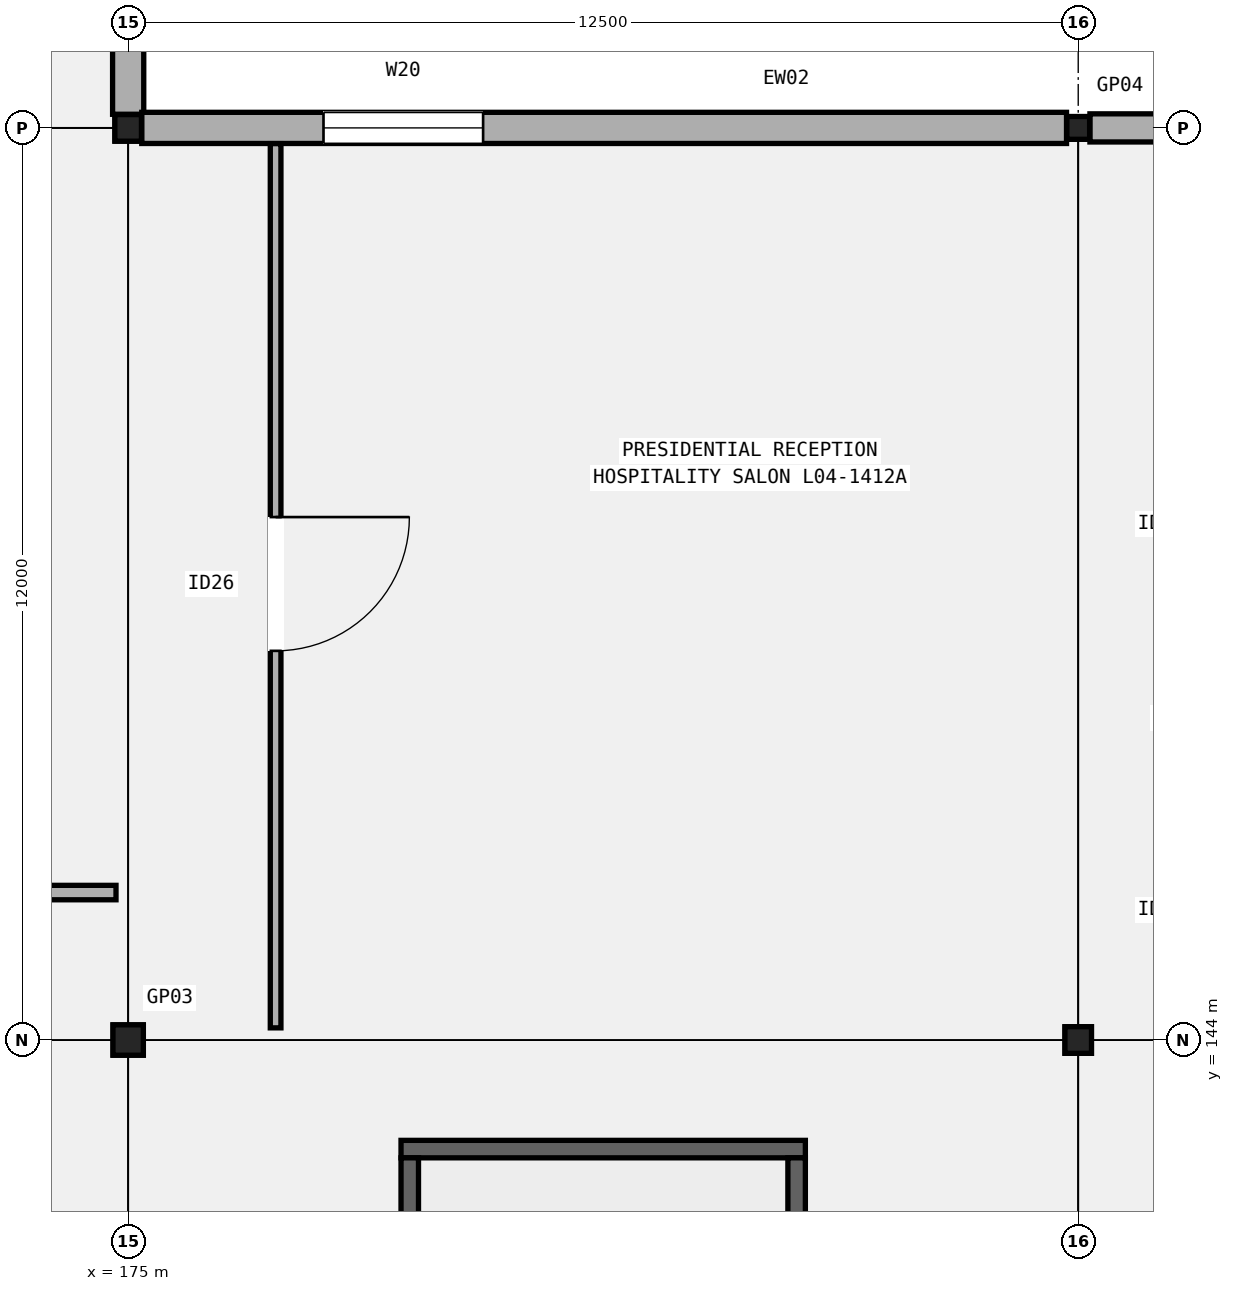
"""IFC4 building model, lengths in metres.
Left out: names, types, materials, properties, quantities, classifications, styles, units other than length and angle.
Written with IfcOpenShell. Run it as: python <this file> out.ifc"""

import sys

from ifc_helpers import new_model, si_unit, direction, frame, frame_2d, origin, origin_2d, place, context, subcontext, project, spatial, rectangle, hollow_rectangle, extrude, element, fill, save


model = new_model("IFC4")
c1 = context("Model", 3, precision=1e-05, world=origin(), true_north=direction((0.0, 1.0)))
c2 = subcontext(c1, "Body", "Model", "MODEL_VIEW")
j1 = project(units=[si_unit("LENGTHUNIT", "METRE"), si_unit("PLANEANGLEUNIT", "RADIAN")], contexts=[c1])
p1 = place(None, origin())
s1 = spatial("IfcSite", under=j1, at=p1, CompositionType="ELEMENT")
p2 = place(p1, origin())
s2 = spatial("IfcBuilding", under=s1, at=p2, CompositionType="ELEMENT")
p3 = place(p2, frame((0.0, 0.0, 20.4)))
s3 = spatial("IfcBuildingStorey", under=s2, at=p3, CompositionType="ELEMENT", Elevation=20.4)
p4 = place(p3, frame((175.0, 144.0, 0.0), z_axis=(0.0, 0.0, 1.0), x_axis=(1.0, 0.0, 0.0)))
e1 = element("IfcColumn", 1, at=p4, inside=s3, PredefinedType="COLUMN", context=c2, shape_type="SweptSolid", body=[
    extrude(hollow_rectangle(XDim=0.4, YDim=0.4, WallThickness=0.016, InnerFilletRadius=0.016, OuterFilletRadius=0.032, at=origin_2d()), origin(), (0.0, 0.0, 1.0), 5.4),
])
for number, where, z_axis, x_axis in (
    (2, (175.0, 156.0, 0.0), (0.0, 0.0, 1.0), (1.0, 0.0, 0.0)),
    (3, (187.5, 144.0, 0.0), (0.0, 0.0, 1.0), (1.0, 0.0, 0.0)),
):
    element("IfcColumn", number, at=place(p3, frame(where, z_axis=z_axis, x_axis=x_axis)), inside=s3, PredefinedType="COLUMN", context=c2, shape_type="SweptSolid", body=[
        extrude(hollow_rectangle(XDim=0.35, YDim=0.35, WallThickness=0.016, InnerFilletRadius=0.016, OuterFilletRadius=0.032, at=origin_2d()), origin(), (0.0, 0.0, 1.0), 5.4),
    ])
p5 = place(p3, frame((187.5, 156.0, 0.0), z_axis=(0.0, 0.0, 1.0), x_axis=(1.0, 0.0, 0.0)))
e4 = element("IfcColumn", 4, at=p5, inside=s3, PredefinedType="COLUMN", context=c2, shape_type="SweptSolid", body=[
    extrude(hollow_rectangle(XDim=0.3, YDim=0.3, WallThickness=0.012, InnerFilletRadius=0.012, OuterFilletRadius=0.024, at=origin_2d()), origin(), (0.0, 0.0, 1.0), 5.4),
])
p6 = place(p3, frame((175.0, 156.179, 0.0), z_axis=(0.0, 0.0, 1.0), x_axis=(0.0, 1.0, 0.0)))
e5 = element("IfcWall", 5, at=p6, inside=s3, PredefinedType="SOLIDWALL", context=c2, shape_type="SweptSolid", body=[
    extrude(rectangle(XDim=11.667, YDim=0.41, at=frame_2d((5.833, 0.0))), origin(), (0.0, 0.0, 1.0), 4.48),
])
p7 = place(p6, frame((2.391, 0.0, 0.95)))
e6 = element("IfcOpeningElement", 6, at=p7, cuts=e5, PredefinedType="OPENING", context=c2, shape_type="SweptSolid", body=[
    extrude(rectangle(XDim=1.95, YDim=2.35, at=frame_2d((0.975, 1.175))), frame((0.0, 0.215, 0.0), z_axis=(0.0, -1.0, 0.0), x_axis=(1.0, 0.0, 0.0)), (0.0, 0.0, 1.0), 0.43),
])
p8 = place(p3, frame((175.179, 156.0, 0.0), z_axis=(0.0, 0.0, 1.0), x_axis=(1.0, 0.0, 0.0)))
e7 = element("IfcWall", 7, at=p8, inside=s3, PredefinedType="SOLIDWALL", context=c2, shape_type="SweptSolid", body=[
    extrude(rectangle(XDim=12.167, YDim=0.41, at=frame_2d((6.083, 0.0))), origin(), (0.0, 0.0, 1.0), 4.48),
])
p9 = place(p8, frame((2.391, 0.0, 0.95)))
e8 = element("IfcOpeningElement", 8, at=p9, cuts=e7, PredefinedType="OPENING", context=c2, shape_type="SweptSolid", body=[
    extrude(rectangle(XDim=2.1, YDim=2.6, at=frame_2d((1.05, 1.3))), frame((0.0, 0.215, 0.0), z_axis=(0.0, -1.0, 0.0), x_axis=(1.0, 0.0, 0.0)), (0.0, 0.0, 1.0), 0.43),
])
p10 = place(p3, frame((187.654, 156.0, 0.0), z_axis=(0.0, 0.0, 1.0), x_axis=(1.0, 0.0, 0.0)))
e9 = element("IfcWall", 9, at=p10, inside=s3, PredefinedType="SOLIDWALL", context=c2, shape_type="SweptSolid", body=[
    extrude(rectangle(XDim=12.217, YDim=0.37, at=frame_2d((6.108, 0.0))), origin(), (0.0, 0.0, 1.0), 4.58),
])
p11 = place(p10, frame((1.5, 0.0, 0.95)))
e10 = element("IfcOpeningElement", 10, at=p11, cuts=e9, PredefinedType="OPENING", context=c2, shape_type="SweptSolid", body=[
    extrude(rectangle(XDim=2.7, YDim=1.75, at=frame_2d((1.35, 0.875))), frame((0.0, 0.195, 0.0), z_axis=(0.0, -1.0, 0.0), x_axis=(1.0, 0.0, 0.0)), (0.0, 0.0, 1.0), 0.39),
])
p12 = place(p3, frame((178.59, 142.565, 0.0), z_axis=(0.0, 0.0, 1.0), x_axis=(1.0, 0.0, 0.0)))
e11 = element("IfcWall", 11, at=p12, inside=s3, PredefinedType="SHEAR", context=c2, shape_type="SweptSolid", body=[
    extrude(rectangle(XDim=5.32, YDim=0.23, at=frame_2d((2.66, 0.0))), origin(), (0.0, 0.0, 1.0), 5.18),
])
for number, where, z_axis, x_axis in (
    (12, (178.705, 133.55, 0.0), (0.0, 0.0, 1.0), (0.0, 1.0, 0.0)),
    (13, (183.795, 133.55, 0.0), (0.0, 0.0, 1.0), (0.0, 1.0, 0.0)),
):
    element("IfcWall", number, at=place(p3, frame(where, z_axis=z_axis, x_axis=x_axis)), inside=s3, PredefinedType="SHEAR", context=c2, shape_type="SweptSolid", body=[
        extrude(rectangle(XDim=8.9, YDim=0.23, at=frame_2d((4.45, 0.0))), origin(), (0.0, 0.0, 1.0), 5.18),
    ])
p13 = place(p3, frame((162.66, 145.94, 0.0), z_axis=(0.0, 0.0, 1.0), x_axis=(1.0, 0.0, 0.0)))
e14 = element("IfcWall", 14, at=p13, inside=s3, PredefinedType="PARTITIONING", context=c2, shape_type="SweptSolid", body=[
    extrude(rectangle(XDim=12.18, YDim=0.19, at=frame_2d((6.09, 0.0))), origin(), (0.0, 0.0, 1.0), 4.52),
])
p14 = place(p13, frame((2.326, 0.0, 0.0)))
e15 = element("IfcOpeningElement", 15, at=p14, cuts=e14, PredefinedType="OPENING", context=c2, shape_type="SweptSolid", body=[
    extrude(rectangle(XDim=1.48, YDim=2.24, at=frame_2d((0.74, 1.12))), frame((0.0, 0.105, 0.0), z_axis=(0.0, -1.0, 0.0), x_axis=(1.0, 0.0, 0.0)), (0.0, 0.0, 1.0), 0.21),
])
p15 = place(p13, frame((8.476, 0.0, 0.0)))
e16 = element("IfcOpeningElement", 16, at=p15, cuts=e14, PredefinedType="OPENING", context=c2, shape_type="SweptSolid", body=[
    extrude(rectangle(XDim=1.52, YDim=2.28, at=frame_2d((0.76, 1.14))), frame((0.0, 0.105, 0.0), z_axis=(0.0, -1.0, 0.0), x_axis=(1.0, 0.0, 0.0)), (0.0, 0.0, 1.0), 0.21),
])
p16 = place(p3, frame((176.94, 144.16, 0.0), z_axis=(0.0, 0.0, 1.0), x_axis=(0.0, 1.0, 0.0)))
e17 = element("IfcWall", 17, at=p16, inside=s3, PredefinedType="PARTITIONING", context=c2, shape_type="SweptSolid", body=[
    extrude(rectangle(XDim=11.633, YDim=0.14, at=frame_2d((5.816, 0.0))), origin(), (0.0, 0.0, 1.0), 4.52),
])
p17 = place(p16, frame((6.72, 0.0, 0.0), z_axis=(0.0, 0.0, 1.0), x_axis=(-1.0, 0.0, 0.0)))
e18 = element("IfcOpeningElement", 18, at=p17, cuts=e17, PredefinedType="OPENING", context=c2, shape_type="SweptSolid", body=[
    extrude(rectangle(XDim=1.76, YDim=2.3, at=frame_2d((0.88, 1.15))), frame((0.0, 0.08, 0.0), z_axis=(0.0, -1.0, 0.0), x_axis=(1.0, 0.0, 0.0)), (0.0, 0.0, 1.0), 0.16),
])
p18 = place(p9, origin())
e19 = element("IfcWindow", 19, at=p18, inside=s3, PartitioningType="SINGLE_PANEL", PredefinedType="WINDOW", context=c2, shape_type="SweptSolid", body=[
    extrude(rectangle(XDim=2.1, YDim=2.6, at=frame_2d((1.05, 1.3))), frame((0.0, 0.03, 0.0), z_axis=(0.0, -1.0, 0.0), x_axis=(1.0, 0.0, 0.0)), (0.0, 0.0, 1.0), 0.06),
])
fill(e8, e19)
p19 = place(p17, origin())
e20 = element("IfcDoor", 20, at=p19, inside=s3, OperationType="SINGLE_SWING_LEFT", PredefinedType="DOOR", context=c2, shape_type="SweptSolid", body=[
    extrude(rectangle(XDim=1.76, YDim=2.3, at=frame_2d((0.88, 1.15))), frame((0.0, 0.025, 0.0), z_axis=(0.0, -1.0, 0.0), x_axis=(1.0, 0.0, 0.0)), (0.0, 0.0, 1.0), 0.05),
])
fill(e18, e20)
save(model, sys.argv[1])
